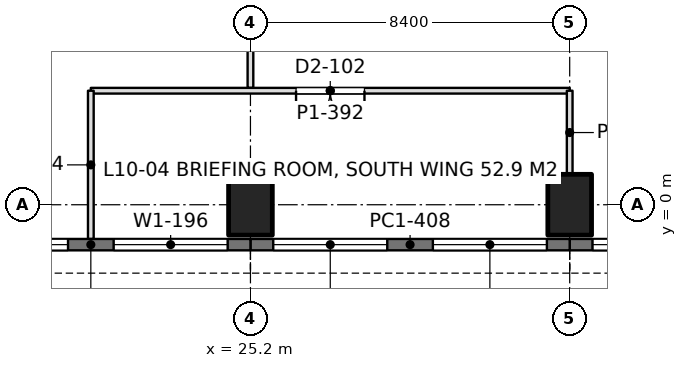
"""IFC4 building model, lengths in metres.
Left out: names, types, materials, properties, quantities, classifications, styles, units other than length and angle.
Written with IfcOpenShell. Run it as: python <this file> out.ifc"""

import sys

from ifc_helpers import new_model, si_unit, direction, frame, frame_2d, origin, origin_2d, place, context, subcontext, project, spatial, rectangle, extrude, element, fill, save


model = new_model("IFC4")
c1 = context("Model", 3, precision=1e-05, world=origin(), true_north=direction((0.0, 1.0)))
c2 = subcontext(c1, "Body", "Model", "MODEL_VIEW")
j1 = project(units=[si_unit("LENGTHUNIT", "METRE"), si_unit("PLANEANGLEUNIT", "RADIAN")], contexts=[c1])
p1 = place(None, origin())
s1 = spatial("IfcSite", under=j1, at=p1, CompositionType="ELEMENT")
p2 = place(p1, origin())
s2 = spatial("IfcBuilding", under=s1, at=p2, CompositionType="ELEMENT")
p3 = place(p2, frame((0.0, 0.0, 45.9)))
s3 = spatial("IfcBuildingStorey", under=s2, at=p3, CompositionType="ELEMENT", Elevation=45.9)
for number, where, z_axis, x_axis in (
    (1, (25.2, 0.0, 0.0), (0.0, 0.0, 1.0), (1.0, 0.0, 0.0)),
    (2, (33.6, 0.0, 0.0), (0.0, 0.0, 1.0), (1.0, 0.0, 0.0)),
):
    element("IfcColumn", number, at=place(p3, frame(where, z_axis=z_axis, x_axis=x_axis)), inside=s3, PredefinedType="COLUMN", context=c2, shape_type="SweptSolid", body=[
        extrude(rectangle(XDim=1.15, YDim=1.6, at=origin_2d()), origin(), (0.0, 0.0, 1.0), 4.5),
    ])
p4 = place(p3, frame((42.0, -1.05, 0.0), z_axis=(0.0, 0.0, 1.0), x_axis=(-1.0, 0.0, 0.0)))
e3 = element("IfcWall", 3, at=p4, inside=s3, PredefinedType="SOLIDWALL", context=c2, shape_type="SweptSolid", body=[
    extrude(rectangle(XDim=8.4, YDim=0.3, at=frame_2d((4.2, 0.0))), origin(), (0.0, 0.0, 1.0), 4.34),
])
p5 = place(p4, frame((0.6, 0.0, 0.9)))
e4 = element("IfcOpeningElement", 4, at=p5, cuts=e3, PredefinedType="OPENING", context=c2, shape_type="SweptSolid", body=[
    extrude(rectangle(XDim=3.0, YDim=1.9, at=frame_2d((1.5, 0.95))), frame((0.0, 0.16, 0.0), z_axis=(0.0, -1.0, 0.0), x_axis=(1.0, 0.0, 0.0)), (0.0, 0.0, 1.0), 0.32),
])
p6 = place(p4, frame((4.8, 0.0, 0.9)))
e5 = element("IfcOpeningElement", 5, at=p6, cuts=e3, PredefinedType="OPENING", context=c2, shape_type="SweptSolid", body=[
    extrude(rectangle(XDim=3.0, YDim=1.9, at=frame_2d((1.5, 0.95))), frame((0.0, 0.16, 0.0), z_axis=(0.0, -1.0, 0.0), x_axis=(1.0, 0.0, 0.0)), (0.0, 0.0, 1.0), 0.32),
])
p7 = place(p3, frame((33.6, -1.05, 0.0), z_axis=(0.0, 0.0, 1.0), x_axis=(-1.0, 0.0, 0.0)))
e6 = element("IfcWall", 6, at=p7, inside=s3, PredefinedType="SOLIDWALL", context=c2, shape_type="SweptSolid", body=[
    extrude(rectangle(XDim=8.4, YDim=0.3, at=frame_2d((4.2, 0.0))), origin(), (0.0, 0.0, 1.0), 4.34),
])
p8 = place(p7, frame((0.6, 0.0, 0.9)))
e7 = element("IfcOpeningElement", 7, at=p8, cuts=e6, PredefinedType="OPENING", context=c2, shape_type="SweptSolid", body=[
    extrude(rectangle(XDim=3.0, YDim=1.9, at=frame_2d((1.5, 0.95))), frame((0.0, 0.16, 0.0), z_axis=(0.0, -1.0, 0.0), x_axis=(1.0, 0.0, 0.0)), (0.0, 0.0, 1.0), 0.32),
])
p9 = place(p7, frame((4.8, 0.0, 0.9)))
e8 = element("IfcOpeningElement", 8, at=p9, cuts=e6, PredefinedType="OPENING", context=c2, shape_type="SweptSolid", body=[
    extrude(rectangle(XDim=3.0, YDim=1.9, at=frame_2d((1.5, 0.95))), frame((0.0, 0.16, 0.0), z_axis=(0.0, -1.0, 0.0), x_axis=(1.0, 0.0, 0.0)), (0.0, 0.0, 1.0), 0.32),
])
p10 = place(p3, frame((25.2, -1.05, 0.0), z_axis=(0.0, 0.0, 1.0), x_axis=(-1.0, 0.0, 0.0)))
e9 = element("IfcWall", 9, at=p10, inside=s3, PredefinedType="SOLIDWALL", context=c2, shape_type="SweptSolid", body=[
    extrude(rectangle(XDim=8.4, YDim=0.3, at=frame_2d((4.2, 0.0))), origin(), (0.0, 0.0, 1.0), 4.34),
])
p11 = place(p10, frame((0.6, 0.0, 0.9)))
e10 = element("IfcOpeningElement", 10, at=p11, cuts=e9, PredefinedType="OPENING", context=c2, shape_type="SweptSolid", body=[
    extrude(rectangle(XDim=3.0, YDim=1.9, at=frame_2d((1.5, 0.95))), frame((0.0, 0.16, 0.0), z_axis=(0.0, -1.0, 0.0), x_axis=(1.0, 0.0, 0.0)), (0.0, 0.0, 1.0), 0.32),
])
p12 = place(p10, frame((4.8, 0.0, 0.9)))
e11 = element("IfcOpeningElement", 11, at=p12, cuts=e9, PredefinedType="OPENING", context=c2, shape_type="SweptSolid", body=[
    extrude(rectangle(XDim=3.0, YDim=1.9, at=frame_2d((1.5, 0.95))), frame((0.0, 0.16, 0.0), z_axis=(0.0, -1.0, 0.0), x_axis=(1.0, 0.0, 0.0)), (0.0, 0.0, 1.0), 0.32),
])
p13 = place(p3, frame((21.0, 3.0, 0.0), z_axis=(0.0, 0.0, 1.0), x_axis=(1.0, 0.0, 0.0)))
e12 = element("IfcWall", 12, at=p13, inside=s3, PredefinedType="PARTITIONING", context=c2, shape_type="SweptSolid", body=[
    extrude(rectangle(XDim=12.6, YDim=0.15, at=frame_2d((6.3, 0.0))), origin(), (0.0, 0.0, 1.0), 3.74),
])
p14 = place(p13, frame((5.4, 0.0, 0.0)))
e13 = element("IfcOpeningElement", 13, at=p14, cuts=e12, PredefinedType="OPENING", context=c2, shape_type="SweptSolid", body=[
    extrude(rectangle(XDim=1.8, YDim=2.2, at=frame_2d((0.9, 1.1))), frame((0.0, 0.085, 0.0), z_axis=(0.0, -1.0, 0.0), x_axis=(1.0, 0.0, 0.0)), (0.0, 0.0, 1.0), 0.17),
])
p15 = place(p3, frame((21.0, -0.902, 0.0), z_axis=(0.0, 0.0, 1.0), x_axis=(0.0, 1.0, 0.0)))
e14 = element("IfcWall", 14, at=p15, inside=s3, PredefinedType="PARTITIONING", context=c2, shape_type="SweptSolid", body=[
    extrude(rectangle(XDim=3.902, YDim=0.15, at=frame_2d((1.951, 0.0))), origin(), (0.0, 0.0, 1.0), 3.84),
])
p16 = place(p3, frame((33.6, 0.799, 0.0), z_axis=(0.0, 0.0, 1.0), x_axis=(0.0, 1.0, 0.0)))
e15 = element("IfcWall", 15, at=p16, inside=s3, PredefinedType="PARTITIONING", context=c2, shape_type="SweptSolid", body=[
    extrude(rectangle(XDim=2.201, YDim=0.15, at=frame_2d((1.101, 0.0))), origin(), (0.0, 0.0, 1.0), 3.74),
])
p17 = place(p3, frame((25.2, 3.074, 0.0), z_axis=(0.0, 0.0, 1.0), x_axis=(0.0, 1.0, 0.0)))
e16 = element("IfcWall", 16, at=p17, inside=s3, PredefinedType="PARTITIONING", context=c2, shape_type="SweptSolid", body=[
    extrude(rectangle(XDim=4.427, YDim=0.15, at=frame_2d((2.213, 0.0))), origin(), (0.0, 0.0, 1.0), 3.74),
])
p18 = place(p6, origin())
e17 = element("IfcWindow", 17, at=p18, inside=s3, PartitioningType="SINGLE_PANEL", PredefinedType="WINDOW", context=c2, shape_type="SweptSolid", body=[
    extrude(rectangle(XDim=3.0, YDim=1.9, at=frame_2d((1.5, 0.95))), frame((0.0, 0.03, 0.0), z_axis=(0.0, -1.0, 0.0), x_axis=(1.0, 0.0, 0.0)), (0.0, 0.0, 1.0), 0.06),
])
fill(e5, e17)
p19 = place(p8, origin())
e18 = element("IfcWindow", 18, at=p19, inside=s3, PartitioningType="SINGLE_PANEL", PredefinedType="WINDOW", context=c2, shape_type="SweptSolid", body=[
    extrude(rectangle(XDim=3.0, YDim=1.9, at=frame_2d((1.5, 0.95))), frame((0.0, 0.03, 0.0), z_axis=(0.0, -1.0, 0.0), x_axis=(1.0, 0.0, 0.0)), (0.0, 0.0, 1.0), 0.06),
])
fill(e7, e18)
p20 = place(p9, origin())
e19 = element("IfcWindow", 19, at=p20, inside=s3, PartitioningType="SINGLE_PANEL", PredefinedType="WINDOW", context=c2, shape_type="SweptSolid", body=[
    extrude(rectangle(XDim=3.0, YDim=1.9, at=frame_2d((1.5, 0.95))), frame((0.0, 0.03, 0.0), z_axis=(0.0, -1.0, 0.0), x_axis=(1.0, 0.0, 0.0)), (0.0, 0.0, 1.0), 0.06),
])
fill(e8, e19)
p21 = place(p11, origin())
e20 = element("IfcWindow", 20, at=p21, inside=s3, PartitioningType="SINGLE_PANEL", PredefinedType="WINDOW", context=c2, shape_type="SweptSolid", body=[
    extrude(rectangle(XDim=3.0, YDim=1.9, at=frame_2d((1.5, 0.95))), frame((0.0, 0.03, 0.0), z_axis=(0.0, -1.0, 0.0), x_axis=(1.0, 0.0, 0.0)), (0.0, 0.0, 1.0), 0.06),
])
fill(e10, e20)
p22 = place(p12, origin())
e21 = element("IfcWindow", 21, at=p22, inside=s3, PartitioningType="SINGLE_PANEL", PredefinedType="WINDOW", context=c2, shape_type="SweptSolid", body=[
    extrude(rectangle(XDim=3.0, YDim=1.9, at=frame_2d((1.5, 0.95))), frame((0.0, 0.03, 0.0), z_axis=(0.0, -1.0, 0.0), x_axis=(1.0, 0.0, 0.0)), (0.0, 0.0, 1.0), 0.06),
])
fill(e11, e21)
p23 = place(p14, frame((1.8, 0.0, 0.0), z_axis=(0.0, 0.0, 1.0), x_axis=(-1.0, 0.0, 0.0)))
e22 = element("IfcDoor", 22, at=p23, inside=s3, OperationType="DOUBLE_DOOR_SINGLE_SWING", PredefinedType="DOOR", context=c2, shape_type="SweptSolid", body=[
    extrude(rectangle(XDim=1.8, YDim=2.2, at=frame_2d((0.9, 1.1))), frame((0.0, 0.025, 0.0), z_axis=(0.0, -1.0, 0.0), x_axis=(1.0, 0.0, 0.0)), (0.0, 0.0, 1.0), 0.05),
])
fill(e13, e22)
save(model, sys.argv[1])
